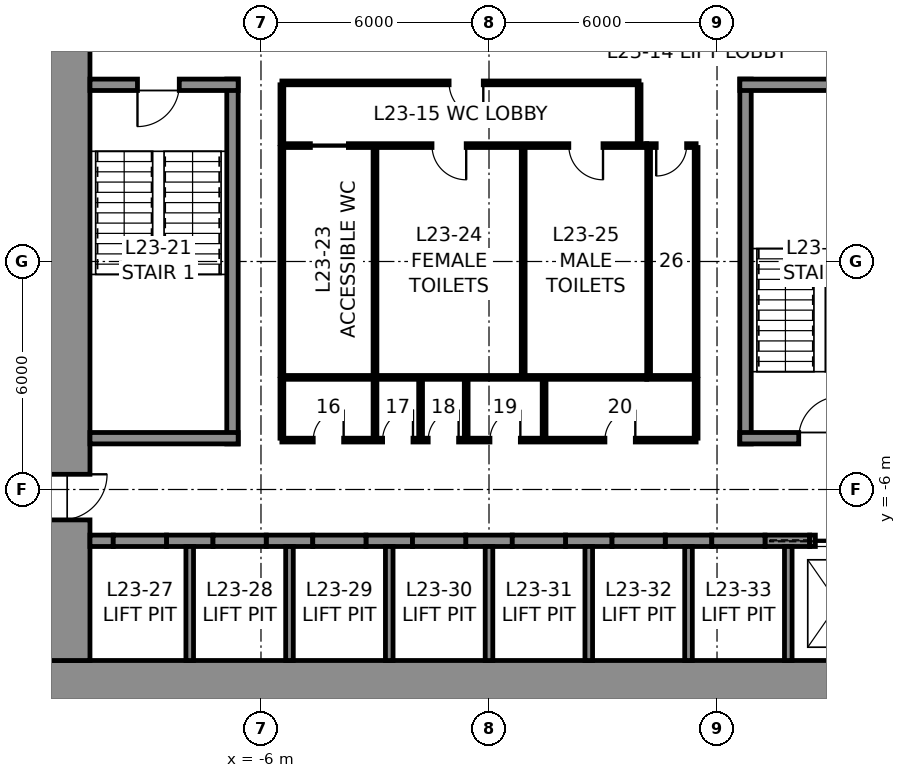
"""IFC4 building model, lengths in metres.
Left out: names, types, materials, properties, quantities, classifications, styles, units other than length and angle.
Written with IfcOpenShell. Run it as: python <this file> out.ifc"""

import sys

from ifc_helpers import new_model, si_unit, direction, frame, frame_2d, origin, place, context, subcontext, project, spatial, rectangle, extrude, element, fill, save


model = new_model("IFC4")
c1 = context("Model", 3, precision=1e-05, world=origin(), true_north=direction((0.0, 1.0)))
c2 = subcontext(c1, "Body", "Model", "MODEL_VIEW")
j1 = project(units=[si_unit("LENGTHUNIT", "METRE"), si_unit("PLANEANGLEUNIT", "RADIAN")], contexts=[c1])
p1 = place(None, origin())
s1 = spatial("IfcSite", under=j1, at=p1, CompositionType="ELEMENT")
p2 = place(p1, origin())
s2 = spatial("IfcBuilding", under=s1, at=p2, CompositionType="ELEMENT")
p3 = place(p2, frame((0.0, 0.0, 118.2)))
s3 = spatial("IfcBuildingStorey", under=s2, at=p3, CompositionType="ELEMENT", Elevation=118.2)
p4 = place(p3, frame((12.0, -11.25, 0.0), z_axis=(0.0, 0.0, 1.0), x_axis=(-1.0, 0.0, 0.0)))
e1 = element("IfcWall", 1, at=p4, inside=s3, PredefinedType="SHEAR", context=c2, shape_type="SweptSolid", body=[
    extrude(rectangle(XDim=24.0, YDim=1.5, at=frame_2d((12.0, 0.0))), origin(), (0.0, 0.0, 1.0), 4.6),
])
p5 = place(p3, frame((-11.25, -10.5, 0.0), z_axis=(0.0, 0.0, 1.0), x_axis=(0.0, 1.0, 0.0)))
e2 = element("IfcWall", 2, at=p5, inside=s3, PredefinedType="SHEAR", context=c2, shape_type="SweptSolid", body=[
    extrude(rectangle(XDim=21.0, YDim=1.5, at=frame_2d((10.5, 0.0))), origin(), (0.0, 0.0, 1.0), 4.6),
])
p6 = place(p5, frame((16.1, 0.0, 0.0)))
e3 = element("IfcOpeningElement", 3, at=p6, cuts=e2, PredefinedType="OPENING", context=c2, shape_type="SweptSolid", body=[
    extrude(rectangle(XDim=1.2, YDim=2.3, at=frame_2d((0.6, 1.15))), frame((0.0, 0.76, 0.0), z_axis=(0.0, -1.0, 0.0), x_axis=(1.0, 0.0, 0.0)), (0.0, 0.0, 1.0), 1.52),
])
p7 = place(p5, frame((3.7, 0.0, 0.0)))
e4 = element("IfcOpeningElement", 4, at=p7, cuts=e2, PredefinedType="OPENING", context=c2, shape_type="SweptSolid", body=[
    extrude(rectangle(XDim=1.2, YDim=2.3, at=frame_2d((0.6, 1.15))), frame((0.0, 0.76, 0.0), z_axis=(0.0, -1.0, 0.0), x_axis=(1.0, 0.0, 0.0)), (0.0, 0.0, 1.0), 1.52),
])
p8 = place(p3, frame((-10.5, -7.35, 0.0), z_axis=(0.0, 0.0, 1.0), x_axis=(1.0, 0.0, 0.0)))
e5 = element("IfcWall", 5, at=p8, inside=s3, PredefinedType="SHEAR", context=c2, shape_type="SweptSolid", body=[
    extrude(rectangle(XDim=0.613, YDim=0.3, at=frame_2d((0.306, 0.0))), origin(), (0.0, 0.0, 1.0), 4.6),
])
for number, where, z_axis, x_axis in (
    (6, (-8.488, -7.35, 0.0), (0.0, 0.0, 1.0), (1.0, 0.0, 0.0)),
    (7, (-5.863, -7.35, 0.0), (0.0, 0.0, 1.0), (1.0, 0.0, 0.0)),
    (8, (-3.238, -7.35, 0.0), (0.0, 0.0, 1.0), (1.0, 0.0, 0.0)),
    (9, (-0.613, -7.35, 0.0), (0.0, 0.0, 1.0), (1.0, 0.0, 0.0)),
    (10, (2.012, -7.35, 0.0), (0.0, 0.0, 1.0), (1.0, 0.0, 0.0)),
    (11, (4.637, -7.35, 0.0), (0.0, 0.0, 1.0), (1.0, 0.0, 0.0)),
):
    element("IfcWall", number, at=place(p3, frame(where, z_axis=z_axis, x_axis=x_axis)), inside=s3, PredefinedType="SHEAR", context=c2, shape_type="SweptSolid", body=[
        extrude(rectangle(XDim=1.225, YDim=0.3, at=frame_2d((0.613, 0.0))), origin(), (0.0, 0.0, 1.0), 4.6),
    ])
p9 = place(p3, frame((7.262, -7.35, 0.0), z_axis=(0.0, 0.0, 1.0), x_axis=(1.0, 0.0, 0.0)))
e12 = element("IfcWall", 12, at=p9, inside=s3, PredefinedType="SHEAR", context=c2, shape_type="SweptSolid", body=[
    extrude(rectangle(XDim=1.175, YDim=0.3, at=frame_2d((0.587, 0.0))), origin(), (0.0, 0.0, 1.0), 4.6),
])
for number, where, z_axis, x_axis in (
    (13, (-9.887, -7.35, 0.0), (0.0, 0.0, 1.0), (1.0, 0.0, 0.0)),
    (14, (-7.262, -7.35, 0.0), (0.0, 0.0, 1.0), (1.0, 0.0, 0.0)),
    (15, (-4.637, -7.35, 0.0), (0.0, 0.0, 1.0), (1.0, 0.0, 0.0)),
    (16, (-2.012, -7.35, 0.0), (0.0, 0.0, 1.0), (1.0, 0.0, 0.0)),
    (17, (0.613, -7.35, 0.0), (0.0, 0.0, 1.0), (1.0, 0.0, 0.0)),
    (18, (3.238, -7.35, 0.0), (0.0, 0.0, 1.0), (1.0, 0.0, 0.0)),
    (19, (5.863, -7.35, 0.0), (0.0, 0.0, 1.0), (1.0, 0.0, 0.0)),
):
    element("IfcWall", number, at=place(p3, frame(where, z_axis=z_axis, x_axis=x_axis)), inside=s3, PredefinedType="PARTITIONING", context=c2, shape_type="SweptSolid", body=[
        extrude(rectangle(XDim=1.4, YDim=0.3, at=frame_2d((0.7, 0.0))), origin(), (0.0, 0.0, 1.0), 4.6),
    ])
p10 = place(p3, frame((8.438, -7.35, 0.0), z_axis=(0.0, 0.0, 1.0), x_axis=(1.0, 0.0, 0.0)))
e20 = element("IfcWall", 20, at=p10, inside=s3, PredefinedType="PARTITIONING", context=c2, shape_type="SweptSolid", body=[
    extrude(rectangle(XDim=1.5, YDim=0.3, at=frame_2d((0.75, 0.0))), origin(), (0.0, 0.0, 1.0), 4.6),
])
p11 = place(p10, frame((0.15, 0.0, 0.0)))
e21 = element("IfcOpeningElement", 21, at=p11, cuts=e20, PredefinedType="OPENING", context=c2, shape_type="SweptSolid", body=[
    extrude(rectangle(XDim=1.2, YDim=2.3, at=frame_2d((0.6, 1.15))), frame((0.0, 0.16, 0.0), z_axis=(0.0, -1.0, 0.0), x_axis=(1.0, 0.0, 0.0)), (0.0, 0.0, 1.0), 0.32),
])
for number, where, z_axis, x_axis in (
    (22, (-7.875, -10.5, 0.0), (0.0, 0.0, 1.0), (0.0, 1.0, 0.0)),
    (23, (-5.25, -10.5, 0.0), (0.0, 0.0, 1.0), (0.0, 1.0, 0.0)),
    (24, (-2.625, -10.5, 0.0), (0.0, 0.0, 1.0), (0.0, 1.0, 0.0)),
    (25, (0.0, -10.5, 0.0), (0.0, 0.0, 1.0), (0.0, 1.0, 0.0)),
    (26, (2.625, -10.5, 0.0), (0.0, 0.0, 1.0), (0.0, 1.0, 0.0)),
    (27, (5.25, -10.5, 0.0), (0.0, 0.0, 1.0), (0.0, 1.0, 0.0)),
    (28, (7.875, -10.5, 0.0), (0.0, 0.0, 1.0), (0.0, 1.0, 0.0)),
):
    element("IfcWall", number, at=place(p3, frame(where, z_axis=z_axis, x_axis=x_axis)), inside=s3, PredefinedType="PARTITIONING", context=c2, shape_type="SweptSolid", body=[
        extrude(rectangle(XDim=3.0, YDim=0.2, at=frame_2d((1.5, 0.0))), origin(), (0.0, 0.0, 1.0), 4.6),
    ])
p12 = place(p3, frame((-6.75, -4.8, 0.0), z_axis=(0.0, 0.0, 1.0), x_axis=(0.0, 1.0, 0.0)))
e29 = element("IfcWall", 29, at=p12, inside=s3, PredefinedType="SOLIDWALL", context=c2, shape_type="SweptSolid", body=[
    extrude(rectangle(XDim=9.6, YDim=0.3, at=frame_2d((4.8, 0.0))), origin(), (0.0, 0.0, 1.0), 4.35),
])
p13 = place(p3, frame((-10.5, 4.65, 0.0), z_axis=(0.0, 0.0, 1.0), x_axis=(1.0, 0.0, 0.0)))
e30 = element("IfcWall", 30, at=p13, inside=s3, PredefinedType="SOLIDWALL", context=c2, shape_type="SweptSolid", body=[
    extrude(rectangle(XDim=3.9, YDim=0.3, at=frame_2d((1.95, 0.0))), origin(), (0.0, 0.0, 1.0), 4.35),
])
p14 = place(p13, frame((1.25, 0.0, 0.0)))
e31 = element("IfcOpeningElement", 31, at=p14, cuts=e30, PredefinedType="OPENING", context=c2, shape_type="SweptSolid", body=[
    extrude(rectangle(XDim=1.1, YDim=2.3, at=frame_2d((0.55, 1.15))), frame((0.0, 0.16, 0.0), z_axis=(0.0, -1.0, 0.0), x_axis=(1.0, 0.0, 0.0)), (0.0, 0.0, 1.0), 0.32),
])
p15 = place(p3, frame((-6.6, -4.65, 0.0), z_axis=(0.0, 0.0, 1.0), x_axis=(-1.0, 0.0, 0.0)))
e32 = element("IfcWall", 32, at=p15, inside=s3, PredefinedType="SOLIDWALL", context=c2, shape_type="SweptSolid", body=[
    extrude(rectangle(XDim=3.9, YDim=0.3, at=frame_2d((1.95, 0.0))), origin(), (0.0, 0.0, 1.0), 4.35),
])
p16 = place(p3, frame((6.75, -4.8, 0.0), z_axis=(0.0, 0.0, 1.0), x_axis=(0.0, 1.0, 0.0)))
e33 = element("IfcWall", 33, at=p16, inside=s3, PredefinedType="SOLIDWALL", context=c2, shape_type="SweptSolid", body=[
    extrude(rectangle(XDim=9.6, YDim=0.3, at=frame_2d((4.8, 0.0))), origin(), (0.0, 0.0, 1.0), 4.35),
])
p17 = place(p3, frame((6.6, 4.65, 0.0), z_axis=(0.0, 0.0, 1.0), x_axis=(1.0, 0.0, 0.0)))
e34 = element("IfcWall", 34, at=p17, inside=s3, PredefinedType="SOLIDWALL", context=c2, shape_type="SweptSolid", body=[
    extrude(rectangle(XDim=3.9, YDim=0.3, at=frame_2d((1.95, 0.0))), origin(), (0.0, 0.0, 1.0), 4.35),
])
p18 = place(p3, frame((10.5, -4.65, 0.0), z_axis=(0.0, 0.0, 1.0), x_axis=(-1.0, 0.0, 0.0)))
e35 = element("IfcWall", 35, at=p18, inside=s3, PredefinedType="SOLIDWALL", context=c2, shape_type="SweptSolid", body=[
    extrude(rectangle(XDim=3.9, YDim=0.3, at=frame_2d((1.95, 0.0))), origin(), (0.0, 0.0, 1.0), 4.35),
])
p19 = place(p18, frame((1.25, 0.0, 0.0)))
e36 = element("IfcOpeningElement", 36, at=p19, cuts=e35, PredefinedType="OPENING", context=c2, shape_type="SweptSolid", body=[
    extrude(rectangle(XDim=1.1, YDim=2.3, at=frame_2d((0.55, 1.15))), frame((0.0, 0.16, 0.0), z_axis=(0.0, -1.0, 0.0), x_axis=(1.0, 0.0, 0.0)), (0.0, 0.0, 1.0), 0.32),
])
p20 = place(p3, frame((-5.45, 3.05, 0.0), z_axis=(0.0, 0.0, 1.0), x_axis=(1.0, 0.0, 0.0)))
e37 = element("IfcWall", 37, at=p20, inside=s3, PredefinedType="PARTITIONING", context=c2, shape_type="SweptSolid", body=[
    extrude(rectangle(XDim=9.6, YDim=0.1, at=frame_2d((4.8, 0.0))), origin(), (0.0, 0.0, 1.0), 4.35),
])
p21 = place(p20, frame((0.75, 0.0, 0.0)))
e38 = element("IfcOpeningElement", 38, at=p21, cuts=e37, PredefinedType="OPENING", context=c2, shape_type="SweptSolid", body=[
    extrude(rectangle(XDim=1.0, YDim=2.3, at=frame_2d((0.5, 1.15))), frame((0.0, 0.06, 0.0), z_axis=(0.0, -1.0, 0.0), x_axis=(1.0, 0.0, 0.0)), (0.0, 0.0, 1.0), 0.12),
])
p22 = place(p20, frame((3.95, 0.0, 0.0)))
e39 = element("IfcOpeningElement", 39, at=p22, cuts=e37, PredefinedType="OPENING", context=c2, shape_type="SweptSolid", body=[
    extrude(rectangle(XDim=0.9, YDim=2.3, at=frame_2d((0.45, 1.15))), frame((0.0, 0.06, 0.0), z_axis=(0.0, -1.0, 0.0), x_axis=(1.0, 0.0, 0.0)), (0.0, 0.0, 1.0), 0.12),
])
p23 = place(p20, frame((7.55, 0.0, 0.0)))
e40 = element("IfcOpeningElement", 40, at=p23, cuts=e37, PredefinedType="OPENING", context=c2, shape_type="SweptSolid", body=[
    extrude(rectangle(XDim=0.9, YDim=2.3, at=frame_2d((0.45, 1.15))), frame((0.0, 0.06, 0.0), z_axis=(0.0, -1.0, 0.0), x_axis=(1.0, 0.0, 0.0)), (0.0, 0.0, 1.0), 0.12),
])
p24 = place(p3, frame((4.15, 3.05, 0.0), z_axis=(0.0, 0.0, 1.0), x_axis=(1.0, 0.0, 0.0)))
e41 = element("IfcWall", 41, at=p24, inside=s3, PredefinedType="PARTITIONING", context=c2, shape_type="SweptSolid", body=[
    extrude(rectangle(XDim=1.3, YDim=0.1, at=frame_2d((0.65, 0.0))), origin(), (0.0, 0.0, 1.0), 4.35),
])
p25 = place(p24, frame((0.25, 0.0, 0.0)))
e42 = element("IfcOpeningElement", 42, at=p25, cuts=e41, PredefinedType="OPENING", context=c2, shape_type="SweptSolid", body=[
    extrude(rectangle(XDim=0.8, YDim=2.3, at=frame_2d((0.4, 1.15))), frame((0.0, 0.06, 0.0), z_axis=(0.0, -1.0, 0.0), x_axis=(1.0, 0.0, 0.0)), (0.0, 0.0, 1.0), 0.12),
])
p26 = place(p3, frame((4.15, -3.05, 0.0), z_axis=(0.0, 0.0, 1.0), x_axis=(-1.0, 0.0, 0.0)))
e43 = element("IfcWall", 43, at=p26, inside=s3, PredefinedType="PARTITIONING", context=c2, shape_type="SweptSolid", body=[
    extrude(rectangle(XDim=9.6, YDim=0.1, at=frame_2d((4.8, 0.0))), origin(), (0.0, 0.0, 1.0), 4.35),
])
p27 = place(p3, frame((5.45, -3.05, 0.0), z_axis=(0.0, 0.0, 1.0), x_axis=(-1.0, 0.0, 0.0)))
e44 = element("IfcWall", 44, at=p27, inside=s3, PredefinedType="PARTITIONING", context=c2, shape_type="SweptSolid", body=[
    extrude(rectangle(XDim=1.3, YDim=0.1, at=frame_2d((0.65, 0.0))), origin(), (0.0, 0.0, 1.0), 4.35),
])
for number, where, z_axis, x_axis in (
    (45, (5.45, 3.0, 0.0), (0.0, 0.0, 1.0), (0.0, -1.0, 0.0)),
    (46, (-5.45, -3.0, 0.0), (0.0, 0.0, 1.0), (0.0, 1.0, 0.0)),
    (47, (-3.0, -3.0, 0.0), (0.0, 0.0, 1.0), (0.0, 1.0, 0.0)),
    (48, (0.9, -3.0, 0.0), (0.0, 0.0, 1.0), (0.0, 1.0, 0.0)),
    (49, (4.2, -3.0, 0.0), (0.0, 0.0, 1.0), (0.0, 1.0, 0.0)),
):
    element("IfcWall", number, at=place(p3, frame(where, z_axis=z_axis, x_axis=x_axis)), inside=s3, PredefinedType="PARTITIONING", context=c2, shape_type="SweptSolid", body=[
        extrude(rectangle(XDim=6.0, YDim=0.1, at=frame_2d((3.0, 0.0))), origin(), (0.0, 0.0, 1.0), 4.35),
    ])
p28 = place(p3, frame((-5.45, 4.7, 0.0), z_axis=(0.0, 0.0, 1.0), x_axis=(1.0, 0.0, 0.0)))
e50 = element("IfcWall", 50, at=p28, inside=s3, PredefinedType="PARTITIONING", context=c2, shape_type="SweptSolid", body=[
    extrude(rectangle(XDim=9.4, YDim=0.1, at=frame_2d((4.7, 0.0))), origin(), (0.0, 0.0, 1.0), 4.35),
])
p29 = place(p28, frame((4.4, 0.0, 0.0)))
e51 = element("IfcOpeningElement", 51, at=p29, cuts=e50, PredefinedType="OPENING", context=c2, shape_type="SweptSolid", body=[
    extrude(rectangle(XDim=0.9, YDim=2.3, at=frame_2d((0.45, 1.15))), frame((0.0, 0.06, 0.0), z_axis=(0.0, -1.0, 0.0), x_axis=(1.0, 0.0, 0.0)), (0.0, 0.0, 1.0), 0.12),
])
for number, where, z_axis, x_axis in (
    (52, (-5.45, 3.1, 0.0), (0.0, 0.0, 1.0), (0.0, 1.0, 0.0)),
    (53, (3.95, 3.1, 0.0), (0.0, 0.0, 1.0), (0.0, 1.0, 0.0)),
):
    element("IfcWall", number, at=place(p3, frame(where, z_axis=z_axis, x_axis=x_axis)), inside=s3, PredefinedType="PARTITIONING", context=c2, shape_type="SweptSolid", body=[
        extrude(rectangle(XDim=1.55, YDim=0.1, at=frame_2d((0.775, 0.0))), origin(), (0.0, 0.0, 1.0), 4.35),
    ])
p30 = place(p3, frame((5.45, -4.7, 0.0), z_axis=(0.0, 0.0, 1.0), x_axis=(-1.0, 0.0, 0.0)))
e54 = element("IfcWall", 54, at=p30, inside=s3, PredefinedType="PARTITIONING", context=c2, shape_type="SweptSolid", body=[
    extrude(rectangle(XDim=10.9, YDim=0.1, at=frame_2d((5.45, 0.0))), origin(), (0.0, 0.0, 1.0), 4.35),
])
p31 = place(p30, frame((9.275, 0.0, 0.0)))
e55 = element("IfcOpeningElement", 55, at=p31, cuts=e54, PredefinedType="OPENING", context=c2, shape_type="SweptSolid", body=[
    extrude(rectangle(XDim=0.8, YDim=2.3, at=frame_2d((0.4, 1.15))), frame((0.0, 0.06, 0.0), z_axis=(0.0, -1.0, 0.0), x_axis=(1.0, 0.0, 0.0)), (0.0, 0.0, 1.0), 0.12),
])
p32 = place(p30, frame((7.45, 0.0, 0.0)))
e56 = element("IfcOpeningElement", 56, at=p32, cuts=e54, PredefinedType="OPENING", context=c2, shape_type="SweptSolid", body=[
    extrude(rectangle(XDim=0.8, YDim=2.3, at=frame_2d((0.4, 1.15))), frame((0.0, 0.06, 0.0), z_axis=(0.0, -1.0, 0.0), x_axis=(1.0, 0.0, 0.0)), (0.0, 0.0, 1.0), 0.12),
])
p33 = place(p30, frame((6.25, 0.0, 0.0)))
e57 = element("IfcOpeningElement", 57, at=p33, cuts=e54, PredefinedType="OPENING", context=c2, shape_type="SweptSolid", body=[
    extrude(rectangle(XDim=0.8, YDim=2.3, at=frame_2d((0.4, 1.15))), frame((0.0, 0.06, 0.0), z_axis=(0.0, -1.0, 0.0), x_axis=(1.0, 0.0, 0.0)), (0.0, 0.0, 1.0), 0.12),
])
p34 = place(p30, frame((4.625, 0.0, 0.0)))
e58 = element("IfcOpeningElement", 58, at=p34, cuts=e54, PredefinedType="OPENING", context=c2, shape_type="SweptSolid", body=[
    extrude(rectangle(XDim=0.8, YDim=2.3, at=frame_2d((0.4, 1.15))), frame((0.0, 0.06, 0.0), z_axis=(0.0, -1.0, 0.0), x_axis=(1.0, 0.0, 0.0)), (0.0, 0.0, 1.0), 0.12),
])
p35 = place(p30, frame((1.6, 0.0, 0.0)))
e59 = element("IfcOpeningElement", 59, at=p35, cuts=e54, PredefinedType="OPENING", context=c2, shape_type="SweptSolid", body=[
    extrude(rectangle(XDim=0.8, YDim=2.3, at=frame_2d((0.4, 1.15))), frame((0.0, 0.06, 0.0), z_axis=(0.0, -1.0, 0.0), x_axis=(1.0, 0.0, 0.0)), (0.0, 0.0, 1.0), 0.12),
])
for number, where, z_axis, x_axis in (
    (60, (-5.45, -3.1, 0.0), (0.0, 0.0, 1.0), (0.0, -1.0, 0.0)),
    (61, (5.45, -3.1, 0.0), (0.0, 0.0, 1.0), (0.0, -1.0, 0.0)),
    (62, (-3.0, -3.1, 0.0), (0.0, 0.0, 1.0), (0.0, -1.0, 0.0)),
    (63, (-1.8, -3.1, 0.0), (0.0, 0.0, 1.0), (0.0, -1.0, 0.0)),
    (64, (-0.6, -3.1, 0.0), (0.0, 0.0, 1.0), (0.0, -1.0, 0.0)),
    (65, (1.45, -3.1, 0.0), (0.0, 0.0, 1.0), (0.0, -1.0, 0.0)),
):
    element("IfcWall", number, at=place(p3, frame(where, z_axis=z_axis, x_axis=x_axis)), inside=s3, PredefinedType="PARTITIONING", context=c2, shape_type="SweptSolid", body=[
        extrude(rectangle(XDim=1.55, YDim=0.1, at=frame_2d((0.775, 0.0))), origin(), (0.0, 0.0, 1.0), 4.35),
    ])
p36 = place(p14, frame((1.1, 0.0, 0.0), z_axis=(0.0, 0.0, 1.0), x_axis=(-1.0, 0.0, 0.0)))
e66 = element("IfcDoor", 66, at=p36, inside=s3, OperationType="SINGLE_SWING_RIGHT", PredefinedType="DOOR", context=c2, shape_type="SweptSolid", body=[
    extrude(rectangle(XDim=1.1, YDim=2.3, at=frame_2d((0.55, 1.15))), frame((0.0, 0.025, 0.0), z_axis=(0.0, -1.0, 0.0), x_axis=(1.0, 0.0, 0.0)), (0.0, 0.0, 1.0), 0.05),
])
fill(e31, e66)
p37 = place(p19, frame((1.1, 0.0, 0.0), z_axis=(0.0, 0.0, 1.0), x_axis=(-1.0, 0.0, 0.0)))
e67 = element("IfcDoor", 67, at=p37, inside=s3, OperationType="SINGLE_SWING_RIGHT", PredefinedType="DOOR", context=c2, shape_type="SweptSolid", body=[
    extrude(rectangle(XDim=1.1, YDim=2.3, at=frame_2d((0.55, 1.15))), frame((0.0, 0.025, 0.0), z_axis=(0.0, -1.0, 0.0), x_axis=(1.0, 0.0, 0.0)), (0.0, 0.0, 1.0), 0.05),
])
fill(e36, e67)
p38 = place(p21, frame((1.0, 0.0, 0.0), z_axis=(0.0, 0.0, 1.0), x_axis=(-1.0, 0.0, 0.0)))
e68 = element("IfcDoor", 68, at=p38, inside=s3, OperationType="SLIDING_TO_LEFT", PredefinedType="DOOR", context=c2, shape_type="SweptSolid", body=[
    extrude(rectangle(XDim=1.0, YDim=2.3, at=frame_2d((0.5, 1.15))), frame((0.0, 0.025, 0.0), z_axis=(0.0, -1.0, 0.0), x_axis=(1.0, 0.0, 0.0)), (0.0, 0.0, 1.0), 0.05),
])
fill(e38, e68)
p39 = place(p22, frame((0.9, 0.0, 0.0), z_axis=(0.0, 0.0, 1.0), x_axis=(-1.0, 0.0, 0.0)))
e69 = element("IfcDoor", 69, at=p39, inside=s3, OperationType="SINGLE_SWING_LEFT", PredefinedType="DOOR", context=c2, shape_type="SweptSolid", body=[
    extrude(rectangle(XDim=0.9, YDim=2.3, at=frame_2d((0.45, 1.15))), frame((0.0, 0.025, 0.0), z_axis=(0.0, -1.0, 0.0), x_axis=(1.0, 0.0, 0.0)), (0.0, 0.0, 1.0), 0.05),
])
fill(e39, e69)
p40 = place(p23, frame((0.9, 0.0, 0.0), z_axis=(0.0, 0.0, 1.0), x_axis=(-1.0, 0.0, 0.0)))
e70 = element("IfcDoor", 70, at=p40, inside=s3, OperationType="SINGLE_SWING_LEFT", PredefinedType="DOOR", context=c2, shape_type="SweptSolid", body=[
    extrude(rectangle(XDim=0.9, YDim=2.3, at=frame_2d((0.45, 1.15))), frame((0.0, 0.025, 0.0), z_axis=(0.0, -1.0, 0.0), x_axis=(1.0, 0.0, 0.0)), (0.0, 0.0, 1.0), 0.05),
])
fill(e40, e70)
p41 = place(p25, frame((0.8, 0.0, 0.0), z_axis=(0.0, 0.0, 1.0), x_axis=(-1.0, 0.0, 0.0)))
e71 = element("IfcDoor", 71, at=p41, inside=s3, OperationType="SINGLE_SWING_RIGHT", PredefinedType="DOOR", context=c2, shape_type="SweptSolid", body=[
    extrude(rectangle(XDim=0.8, YDim=2.3, at=frame_2d((0.4, 1.15))), frame((0.0, 0.025, 0.0), z_axis=(0.0, -1.0, 0.0), x_axis=(1.0, 0.0, 0.0)), (0.0, 0.0, 1.0), 0.05),
])
fill(e42, e71)
p42 = place(p29, frame((0.9, 0.0, 0.0), z_axis=(0.0, 0.0, 1.0), x_axis=(-1.0, 0.0, 0.0)))
e72 = element("IfcDoor", 72, at=p42, inside=s3, OperationType="SINGLE_SWING_LEFT", PredefinedType="DOOR", context=c2, shape_type="SweptSolid", body=[
    extrude(rectangle(XDim=0.9, YDim=2.3, at=frame_2d((0.45, 1.15))), frame((0.0, 0.025, 0.0), z_axis=(0.0, -1.0, 0.0), x_axis=(1.0, 0.0, 0.0)), (0.0, 0.0, 1.0), 0.05),
])
fill(e51, e72)
p43 = place(p31, frame((0.8, 0.0, 0.0), z_axis=(0.0, 0.0, 1.0), x_axis=(-1.0, 0.0, 0.0)))
e73 = element("IfcDoor", 73, at=p43, inside=s3, OperationType="SINGLE_SWING_RIGHT", PredefinedType="DOOR", context=c2, shape_type="SweptSolid", body=[
    extrude(rectangle(XDim=0.8, YDim=2.3, at=frame_2d((0.4, 1.15))), frame((0.0, 0.025, 0.0), z_axis=(0.0, -1.0, 0.0), x_axis=(1.0, 0.0, 0.0)), (0.0, 0.0, 1.0), 0.05),
])
fill(e55, e73)
p44 = place(p32, frame((0.8, 0.0, 0.0), z_axis=(0.0, 0.0, 1.0), x_axis=(-1.0, 0.0, 0.0)))
e74 = element("IfcDoor", 74, at=p44, inside=s3, OperationType="SINGLE_SWING_RIGHT", PredefinedType="DOOR", context=c2, shape_type="SweptSolid", body=[
    extrude(rectangle(XDim=0.8, YDim=2.3, at=frame_2d((0.4, 1.15))), frame((0.0, 0.025, 0.0), z_axis=(0.0, -1.0, 0.0), x_axis=(1.0, 0.0, 0.0)), (0.0, 0.0, 1.0), 0.05),
])
fill(e56, e74)
p45 = place(p33, frame((0.8, 0.0, 0.0), z_axis=(0.0, 0.0, 1.0), x_axis=(-1.0, 0.0, 0.0)))
e75 = element("IfcDoor", 75, at=p45, inside=s3, OperationType="SINGLE_SWING_RIGHT", PredefinedType="DOOR", context=c2, shape_type="SweptSolid", body=[
    extrude(rectangle(XDim=0.8, YDim=2.3, at=frame_2d((0.4, 1.15))), frame((0.0, 0.025, 0.0), z_axis=(0.0, -1.0, 0.0), x_axis=(1.0, 0.0, 0.0)), (0.0, 0.0, 1.0), 0.05),
])
fill(e57, e75)
p46 = place(p34, frame((0.8, 0.0, 0.0), z_axis=(0.0, 0.0, 1.0), x_axis=(-1.0, 0.0, 0.0)))
e76 = element("IfcDoor", 76, at=p46, inside=s3, OperationType="SINGLE_SWING_RIGHT", PredefinedType="DOOR", context=c2, shape_type="SweptSolid", body=[
    extrude(rectangle(XDim=0.8, YDim=2.3, at=frame_2d((0.4, 1.15))), frame((0.0, 0.025, 0.0), z_axis=(0.0, -1.0, 0.0), x_axis=(1.0, 0.0, 0.0)), (0.0, 0.0, 1.0), 0.05),
])
fill(e58, e76)
p47 = place(p35, frame((0.8, 0.0, 0.0), z_axis=(0.0, 0.0, 1.0), x_axis=(-1.0, 0.0, 0.0)))
e77 = element("IfcDoor", 77, at=p47, inside=s3, OperationType="SINGLE_SWING_RIGHT", PredefinedType="DOOR", context=c2, shape_type="SweptSolid", body=[
    extrude(rectangle(XDim=0.8, YDim=2.3, at=frame_2d((0.4, 1.15))), frame((0.0, 0.025, 0.0), z_axis=(0.0, -1.0, 0.0), x_axis=(1.0, 0.0, 0.0)), (0.0, 0.0, 1.0), 0.05),
])
fill(e59, e77)
p48 = place(p7, frame((1.2, 0.0, 0.0), z_axis=(0.0, 0.0, 1.0), x_axis=(-1.0, 0.0, 0.0)))
e78 = element("IfcDoor", 78, at=p48, inside=s3, OperationType="SINGLE_SWING_LEFT", PredefinedType="DOOR", context=c2, shape_type="SweptSolid", body=[
    extrude(rectangle(XDim=1.2, YDim=2.3, at=frame_2d((0.6, 1.15))), frame((0.0, 0.025, 0.0), z_axis=(0.0, -1.0, 0.0), x_axis=(1.0, 0.0, 0.0)), (0.0, 0.0, 1.0), 0.05),
])
fill(e4, e78)
p49 = place(p11, origin())
e79 = element("IfcDoor", 79, at=p49, inside=s3, OperationType="SLIDING_TO_LEFT", PredefinedType="DOOR", context=c2, shape_type="SweptSolid", body=[
    extrude(rectangle(XDim=1.2, YDim=2.3, at=frame_2d((0.6, 1.15))), frame((0.0, 0.025, 0.0), z_axis=(0.0, -1.0, 0.0), x_axis=(1.0, 0.0, 0.0)), (0.0, 0.0, 1.0), 0.05),
])
fill(e21, e79)
save(model, sys.argv[1])
